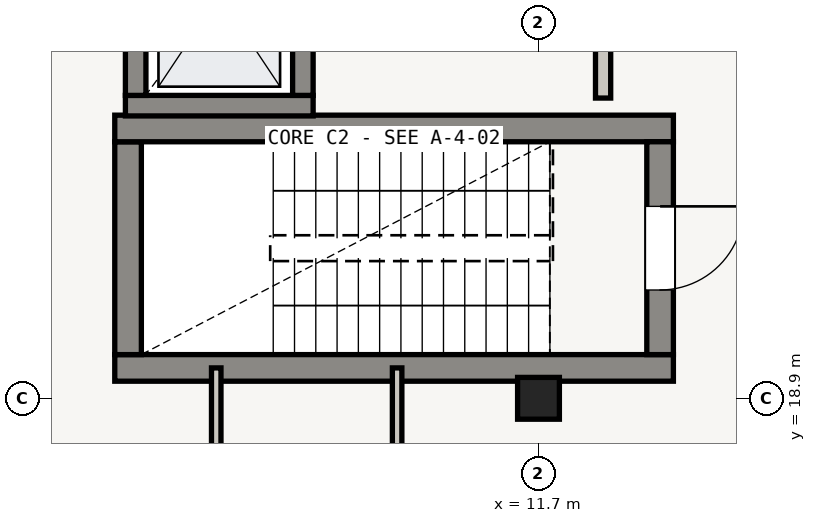
"""IFC4 building model, lengths in metres.
Left out: names, types, materials, properties, quantities, classifications, styles, units other than length and angle.
Written with IfcOpenShell. Run it as: python <this file> out.ifc"""

import sys

from ifc_helpers import new_model, si_unit, direction, frame, frame_2d, origin, origin_2d, place, context, subcontext, project, spatial, rectangle, extrude, element, fill, save


model = new_model("IFC4")
c1 = context("Model", 3, precision=1e-05, world=origin(), true_north=direction((0.0, 1.0)))
c2 = subcontext(c1, "Body", "Model", "MODEL_VIEW")
j1 = project(units=[si_unit("LENGTHUNIT", "METRE"), si_unit("PLANEANGLEUNIT", "RADIAN")], contexts=[c1])
p1 = place(None, origin())
s1 = spatial("IfcSite", under=j1, at=p1, CompositionType="ELEMENT")
p2 = place(p1, origin())
s2 = spatial("IfcBuilding", under=s1, at=p2, CompositionType="ELEMENT")
p3 = place(p2, frame((0.0, 0.0, 4.5)))
s3 = spatial("IfcBuildingStorey", under=s2, at=p3, CompositionType="ELEMENT", Elevation=4.5)
p4 = place(p3, frame((11.7, 18.9, 0.0), z_axis=(0.0, 0.0, 1.0), x_axis=(1.0, 0.0, 0.0)))
e1 = element("IfcColumn", 1, at=p4, inside=s3, PredefinedType="COLUMN", context=c2, shape_type="SweptSolid", body=[
    extrude(rectangle(XDim=0.55, YDim=0.55, at=origin_2d()), origin(), (0.0, 0.0, 1.0), 3.92),
])
p5 = place(p3, frame((13.475, 19.3, 0.0), z_axis=(0.0, 0.0, 1.0), x_axis=(-1.0, 0.0, 0.0)))
e2 = element("IfcWall", 2, at=p5, inside=s3, PredefinedType="SHEAR", context=c2, shape_type="SweptSolid", body=[
    extrude(rectangle(XDim=7.35, YDim=0.35, at=frame_2d((3.675, 0.0))), origin(), (0.0, 0.0, 1.0), 3.92),
])
p6 = place(p3, frame((6.3, 19.475, 0.0), z_axis=(0.0, 0.0, 1.0), x_axis=(0.0, 1.0, 0.0)))
e3 = element("IfcWall", 3, at=p6, inside=s3, PredefinedType="SHEAR", context=c2, shape_type="SweptSolid", body=[
    extrude(rectangle(XDim=2.8, YDim=0.35, at=frame_2d((1.4, 0.0))), origin(), (0.0, 0.0, 1.0), 3.92),
])
p7 = place(p3, frame((6.125, 22.45, 0.0), z_axis=(0.0, 0.0, 1.0), x_axis=(1.0, 0.0, 0.0)))
e4 = element("IfcWall", 4, at=p7, inside=s3, PredefinedType="SHEAR", context=c2, shape_type="SweptSolid", body=[
    extrude(rectangle(XDim=7.35, YDim=0.35, at=frame_2d((3.675, 0.0))), origin(), (0.0, 0.0, 1.0), 3.92),
])
p8 = place(p3, frame((13.3, 22.275, 0.0), z_axis=(0.0, 0.0, 1.0), x_axis=(0.0, -1.0, 0.0)))
e5 = element("IfcWall", 5, at=p8, inside=s3, PredefinedType="SHEAR", context=c2, shape_type="SweptSolid", body=[
    extrude(rectangle(XDim=2.8, YDim=0.35, at=frame_2d((1.4, 0.0))), origin(), (0.0, 0.0, 1.0), 3.92),
])
p9 = place(p8, frame((0.85, 0.0, 0.0)))
e6 = element("IfcOpeningElement", 6, at=p9, cuts=e5, PredefinedType="OPENING", context=c2, shape_type="SweptSolid", body=[
    extrude(rectangle(XDim=1.1, YDim=2.05, at=frame_2d((0.55, 1.025))), frame((0.0, 0.175, 0.0), z_axis=(0.0, -1.0, 0.0), x_axis=(1.0, 0.0, 0.0)), (0.0, 0.0, 1.0), 0.35),
])
p10 = place(p3, frame((8.735, 22.75, 0.0), z_axis=(0.0, 0.0, 1.0), x_axis=(-1.0, 0.0, 0.0)))
e7 = element("IfcWall", 7, at=p10, inside=s3, PredefinedType="SHEAR", context=c2, shape_type="SweptSolid", body=[
    extrude(rectangle(XDim=2.47, YDim=0.27, at=frame_2d((1.235, 0.0))), origin(), (0.0, 0.0, 1.0), 3.92),
])
p11 = place(p3, frame((6.4, 22.885, 0.0), z_axis=(0.0, 0.0, 1.0), x_axis=(0.0, 1.0, 0.0)))
e8 = element("IfcWall", 8, at=p11, inside=s3, PredefinedType="SHEAR", context=c2, shape_type="SweptSolid", body=[
    extrude(rectangle(XDim=2.63, YDim=0.27, at=frame_2d((1.315, 0.0))), origin(), (0.0, 0.0, 1.0), 3.92),
])
p12 = place(p3, frame((8.6, 25.515, 0.0), z_axis=(0.0, 0.0, 1.0), x_axis=(0.0, -1.0, 0.0)))
e9 = element("IfcWall", 9, at=p12, inside=s3, PredefinedType="SHEAR", context=c2, shape_type="SweptSolid", body=[
    extrude(rectangle(XDim=2.63, YDim=0.27, at=frame_2d((1.315, 0.0))), origin(), (0.0, 0.0, 1.0), 3.92),
])
p13 = place(p12, frame((0.755, 0.0, 0.0)))
e10 = element("IfcOpeningElement", 10, at=p13, cuts=e9, PredefinedType="OPENING", context=c2, shape_type="SweptSolid", body=[
    extrude(rectangle(XDim=1.12, YDim=2.1, at=frame_2d((0.56, 1.05))), frame((0.0, 0.135, 0.0), z_axis=(0.0, -1.0, 0.0), x_axis=(1.0, 0.0, 0.0)), (0.0, 0.0, 1.0), 0.27),
])
p14 = place(p3, frame((12.55, 25.75, 0.0), z_axis=(0.0, 0.0, 1.0), x_axis=(0.0, -1.0, 0.0)))
e11 = element("IfcWall", 11, at=p14, inside=s3, PredefinedType="SOLIDWALL", context=c2, shape_type="SweptSolid", body=[
    extrude(rectangle(XDim=2.9, YDim=0.2, at=frame_2d((1.45, 0.0))), origin(), (0.0, 0.0, 1.0), 2.94),
])
p15 = place(p14, frame((0.875, 0.0, 0.0)))
e12 = element("IfcOpeningElement", 12, at=p15, cuts=e11, PredefinedType="OPENING", context=c2, shape_type="SweptSolid", body=[
    extrude(rectangle(XDim=1.15, YDim=2.05, at=frame_2d((0.575, 1.025))), frame((0.0, 0.1, 0.0), z_axis=(0.0, -1.0, 0.0), x_axis=(1.0, 0.0, 0.0)), (0.0, 0.0, 1.0), 0.2),
])
for number, where, z_axis, x_axis in (
    (13, (7.46, 19.3, 0.0), (0.0, 0.0, 1.0), (0.0, -1.0, 0.0)),
    (14, (9.84, 15.92, 0.0), (0.0, 0.0, 1.0), (0.0, 1.0, 0.0)),
):
    element("IfcWall", number, at=place(p3, frame(where, z_axis=z_axis, x_axis=x_axis)), inside=s3, PredefinedType="PARTITIONING", context=c2, shape_type="SweptSolid", body=[
        extrude(rectangle(XDim=3.38, YDim=0.125, at=frame_2d((1.69, 0.0))), origin(), (0.0, 0.0, 1.0), 2.94),
    ])
p16 = place(p9, origin())
e15 = element("IfcDoor", 15, at=p16, inside=s3, OperationType="SINGLE_SWING_LEFT", PredefinedType="DOOR", context=c2, shape_type="SweptSolid", body=[
    extrude(rectangle(XDim=1.1, YDim=2.05, at=frame_2d((0.55, 1.025))), frame((0.0, 0.025, 0.0), z_axis=(0.0, -1.0, 0.0), x_axis=(1.0, 0.0, 0.0)), (0.0, 0.0, 1.0), 0.05),
])
fill(e6, e15)
save(model, sys.argv[1])
